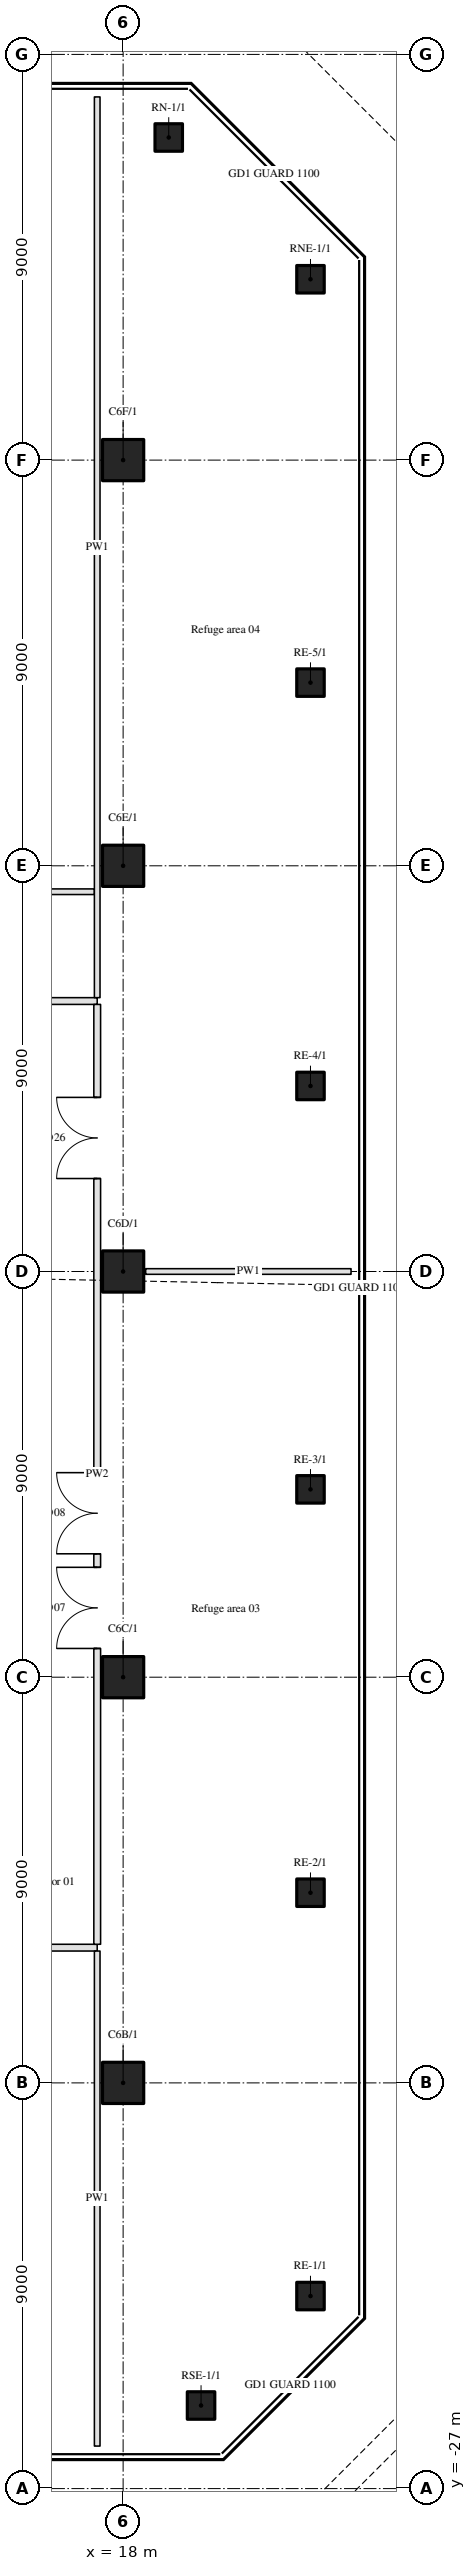
"""IFC4 building model, lengths in metres.
Left out: names, types, materials, properties, quantities, classifications, styles, units other than length and angle.
Written with IfcOpenShell. Run it as: python <this file> out.ifc"""

import sys

from ifc_helpers import new_model, si_unit, direction, frame, frame_2d, origin, origin_2d, place, context, subcontext, project, spatial, rectangle, hollow_circle, extrude, element, fill, save


model = new_model("IFC4")
c1 = context("Model", 3, precision=1e-05, world=origin(), true_north=direction((0.0, 1.0)))
c2 = subcontext(c1, "Body", "Model", "MODEL_VIEW")
j1 = project(units=[si_unit("LENGTHUNIT", "METRE"), si_unit("PLANEANGLEUNIT", "RADIAN")], contexts=[c1])
p1 = place(None, origin())
s1 = spatial("IfcSite", under=j1, at=p1, CompositionType="ELEMENT")
p2 = place(p1, origin())
s2 = spatial("IfcBuilding", under=s1, at=p2, CompositionType="ELEMENT")
p3 = place(p2, frame((0.0, 0.0, 57.6)))
s3 = spatial("IfcBuildingStorey", under=s2, at=p3, CompositionType="ELEMENT", Elevation=57.6)
for number, where, z_axis, x_axis in (
    (1, (18.0, -18.0, 0.0), (0.0, 0.0, 1.0), (1.0, 0.0, 0.0)),
    (2, (18.0, -9.0, 0.0), (0.0, 0.0, 1.0), (1.0, 0.0, 0.0)),
    (3, (18.0, 0.0, 0.0), (0.0, 0.0, 1.0), (1.0, 0.0, 0.0)),
    (4, (18.0, 9.0, 0.0), (0.0, 0.0, 1.0), (1.0, 0.0, 0.0)),
    (5, (18.0, 18.0, 0.0), (0.0, 0.0, 1.0), (1.0, 0.0, 0.0)),
):
    element("IfcColumn", number, at=place(p3, frame(where, z_axis=z_axis, x_axis=x_axis)), inside=s3, PredefinedType="COLUMN", context=c2, shape_type="SweptSolid", body=[
        extrude(hollow_circle(Radius=0.457, WallThickness=0.05, at=origin_2d()), origin(), (0.0, 0.0, 1.0), 4.5),
    ])
for number, where, z_axis, x_axis in (
    (6, (19.729, -25.157, 0.0), (0.0, 0.0, 1.0), (1.0, 0.0, 0.0)),
    (7, (22.157, -22.729, 0.0), (0.0, 0.0, 1.0), (1.0, 0.0, 0.0)),
):
    element("IfcColumn", number, at=place(p3, frame(where, z_axis=z_axis, x_axis=x_axis)), inside=s3, PredefinedType="COLUMN", context=c2, shape_type="SweptSolid", body=[
        extrude(hollow_circle(Radius=0.305, WallThickness=0.03, at=origin_2d()), origin(), (0.0, 0.0, 1.0), 4.08),
    ])
p4 = place(p3, frame((22.157, -13.781, 0.0), z_axis=(0.0, 0.0, 1.0), x_axis=(1.0, 0.0, 0.0)))
e8 = element("IfcColumn", 8, at=p4, inside=s3, PredefinedType="COLUMN", context=c2, shape_type="SweptSolid", body=[
    extrude(hollow_circle(Radius=0.305, WallThickness=0.03, at=origin_2d()), origin(), (0.0, 0.0, 1.0), 4.5),
])
for number, where, z_axis, x_axis in (
    (9, (22.157, -4.833, 0.0), (0.0, 0.0, 1.0), (1.0, 0.0, 0.0)),
    (10, (22.157, 4.116, 0.0), (0.0, 0.0, 1.0), (1.0, 0.0, 0.0)),
    (11, (22.157, 13.064, 0.0), (0.0, 0.0, 1.0), (1.0, 0.0, 0.0)),
    (12, (22.157, 22.012, 0.0), (0.0, 0.0, 1.0), (1.0, 0.0, 0.0)),
    (13, (19.012, 25.157, 0.0), (0.0, 0.0, 1.0), (1.0, 0.0, 0.0)),
):
    element("IfcColumn", number, at=place(p3, frame(where, z_axis=z_axis, x_axis=x_axis)), inside=s3, PredefinedType="COLUMN", context=c2, shape_type="SweptSolid", body=[
        extrude(hollow_circle(Radius=0.305, WallThickness=0.03, at=origin_2d()), origin(), (0.0, 0.0, 1.0), 4.08),
    ])
p5 = place(p3, frame((-17.425, -15.0, 0.0), z_axis=(0.0, 0.0, 1.0), x_axis=(1.0, 0.0, 0.0)))
e14 = element("IfcWall", 14, at=p5, inside=s3, PredefinedType="PARTITIONING", context=c2, shape_type="SweptSolid", body=[
    extrude(rectangle(XDim=34.85, YDim=0.15, at=frame_2d((17.425, 0.0))), origin(), (0.0, 0.0, 1.0), 3.56),
])
p6 = place(p5, frame((16.525, 0.0, 0.0)))
e15 = element("IfcOpeningElement", 15, at=p6, cuts=e14, PredefinedType="OPENING", context=c2, shape_type="SweptSolid", body=[
    extrude(rectangle(XDim=1.8, YDim=2.1, at=frame_2d((0.9, 1.05))), frame((0.0, 0.085, 0.0), z_axis=(0.0, -1.0, 0.0), x_axis=(1.0, 0.0, 0.0)), (0.0, 0.0, 1.0), 0.17),
])
p7 = place(p5, frame((18.625, 0.0, 0.0)))
e16 = element("IfcOpeningElement", 16, at=p7, cuts=e14, PredefinedType="OPENING", context=c2, shape_type="SweptSolid", body=[
    extrude(rectangle(XDim=1.8, YDim=2.1, at=frame_2d((0.9, 1.05))), frame((0.0, 0.085, 0.0), z_axis=(0.0, -1.0, 0.0), x_axis=(1.0, 0.0, 0.0)), (0.0, 0.0, 1.0), 0.17),
])
p8 = place(p3, frame((18.5, 0.0, 0.0), z_axis=(0.0, 0.0, 1.0), x_axis=(1.0, 0.0, 0.0)))
e17 = element("IfcWall", 17, at=p8, inside=s3, PredefinedType="PARTITIONING", context=c2, shape_type="SweptSolid", body=[
    extrude(rectangle(XDim=4.557, YDim=0.125, at=frame_2d((2.278, 0.0))), origin(), (0.0, 0.0, 1.0), 3.56),
])
p9 = place(p3, frame((-0.55, 6.0, 0.0), z_axis=(0.0, 0.0, 1.0), x_axis=(1.0, 0.0, 0.0)))
e18 = element("IfcWall", 18, at=p9, inside=s3, PredefinedType="PARTITIONING", context=c2, shape_type="SweptSolid", body=[
    extrude(rectangle(XDim=17.975, YDim=0.15, at=frame_2d((8.988, 0.0))), origin(), (0.0, 0.0, 1.0), 3.56),
])
p10 = place(p9, frame((1.325, 0.0, 0.0)))
e19 = element("IfcOpeningElement", 19, at=p10, cuts=e18, PredefinedType="OPENING", context=c2, shape_type="SweptSolid", body=[
    extrude(rectangle(XDim=0.9, YDim=2.1, at=frame_2d((0.45, 1.05))), frame((0.0, 0.085, 0.0), z_axis=(0.0, -1.0, 0.0), x_axis=(1.0, 0.0, 0.0)), (0.0, 0.0, 1.0), 0.17),
])
p11 = place(p9, frame((7.1, 0.0, 0.0)))
e20 = element("IfcOpeningElement", 20, at=p11, cuts=e18, PredefinedType="OPENING", context=c2, shape_type="SweptSolid", body=[
    extrude(rectangle(XDim=0.9, YDim=2.1, at=frame_2d((0.45, 1.05))), frame((0.0, 0.085, 0.0), z_axis=(0.0, -1.0, 0.0), x_axis=(1.0, 0.0, 0.0)), (0.0, 0.0, 1.0), 0.17),
])
p12 = place(p9, frame((14.312, 0.0, 0.0)))
e21 = element("IfcOpeningElement", 21, at=p12, cuts=e18, PredefinedType="OPENING", context=c2, shape_type="SweptSolid", body=[
    extrude(rectangle(XDim=0.9, YDim=2.1, at=frame_2d((0.45, 1.05))), frame((0.0, 0.085, 0.0), z_axis=(0.0, -1.0, 0.0), x_axis=(1.0, 0.0, 0.0)), (0.0, 0.0, 1.0), 0.17),
])
p13 = place(p3, frame((-0.65, 8.425, 0.0), z_axis=(0.0, 0.0, 1.0), x_axis=(1.0, 0.0, 0.0)))
e22 = element("IfcWall", 22, at=p13, inside=s3, PredefinedType="PARTITIONING", context=c2, shape_type="SweptSolid", body=[
    extrude(rectangle(XDim=18.012, YDim=0.125, at=frame_2d((9.006, 0.0))), origin(), (0.0, 0.0, 1.0), 3.56),
])
p14 = place(p3, frame((17.425, -26.057, 0.0), z_axis=(0.0, 0.0, 1.0), x_axis=(0.0, 1.0, 0.0)))
e23 = element("IfcWall", 23, at=p14, inside=s3, PredefinedType="PARTITIONING", context=c2, shape_type="SweptSolid", body=[
    extrude(rectangle(XDim=10.982, YDim=0.125, at=frame_2d((5.491, 0.0))), origin(), (0.0, 0.0, 1.0), 3.56),
])
p15 = place(p3, frame((17.425, -14.925, 0.0), z_axis=(0.0, 0.0, 1.0), x_axis=(0.0, 1.0, 0.0)))
e24 = element("IfcWall", 24, at=p15, inside=s3, PredefinedType="PARTITIONING", context=c2, shape_type="SweptSolid", body=[
    extrude(rectangle(XDim=20.85, YDim=0.15, at=frame_2d((10.425, 0.0))), origin(), (0.0, 0.0, 1.0), 3.56),
])
p16 = place(p15, frame((6.562, 0.0, 0.0)))
e25 = element("IfcOpeningElement", 25, at=p16, cuts=e24, PredefinedType="OPENING", context=c2, shape_type="SweptSolid", body=[
    extrude(rectangle(XDim=1.8, YDim=2.1, at=frame_2d((0.9, 1.05))), frame((0.0, 0.085, 0.0), z_axis=(0.0, -1.0, 0.0), x_axis=(1.0, 0.0, 0.0)), (0.0, 0.0, 1.0), 0.17),
])
p17 = place(p15, frame((8.663, 0.0, 0.0)))
e26 = element("IfcOpeningElement", 26, at=p17, cuts=e24, PredefinedType="OPENING", context=c2, shape_type="SweptSolid", body=[
    extrude(rectangle(XDim=1.8, YDim=2.1, at=frame_2d((0.9, 1.05))), frame((0.0, 0.085, 0.0), z_axis=(0.0, -1.0, 0.0), x_axis=(1.0, 0.0, 0.0)), (0.0, 0.0, 1.0), 0.17),
])
p18 = place(p15, frame((16.988, 0.0, 0.0)))
e27 = element("IfcOpeningElement", 27, at=p18, cuts=e24, PredefinedType="OPENING", context=c2, shape_type="SweptSolid", body=[
    extrude(rectangle(XDim=1.8, YDim=2.1, at=frame_2d((0.9, 1.05))), frame((0.0, 0.085, 0.0), z_axis=(0.0, -1.0, 0.0), x_axis=(1.0, 0.0, 0.0)), (0.0, 0.0, 1.0), 0.17),
])
p19 = place(p3, frame((17.425, 6.075, 0.0), z_axis=(0.0, 0.0, 1.0), x_axis=(0.0, 1.0, 0.0)))
e28 = element("IfcWall", 28, at=p19, inside=s3, PredefinedType="PARTITIONING", context=c2, shape_type="SweptSolid", body=[
    extrude(rectangle(XDim=19.982, YDim=0.125, at=frame_2d((9.991, 0.0))), origin(), (0.0, 0.0, 1.0), 3.56),
])
p20 = place(p16, origin())
e29 = element("IfcDoor", 29, at=p20, inside=s3, OperationType="DOUBLE_DOOR_SINGLE_SWING", PredefinedType="DOOR", context=c2, shape_type="SweptSolid", body=[
    extrude(rectangle(XDim=1.8, YDim=2.1, at=frame_2d((0.9, 1.05))), frame((0.0, 0.025, 0.0), z_axis=(0.0, -1.0, 0.0), x_axis=(1.0, 0.0, 0.0)), (0.0, 0.0, 1.0), 0.05),
])
fill(e25, e29)
p21 = place(p17, origin())
e30 = element("IfcDoor", 30, at=p21, inside=s3, OperationType="DOUBLE_DOOR_SINGLE_SWING", PredefinedType="DOOR", context=c2, shape_type="SweptSolid", body=[
    extrude(rectangle(XDim=1.8, YDim=2.1, at=frame_2d((0.9, 1.05))), frame((0.0, 0.025, 0.0), z_axis=(0.0, -1.0, 0.0), x_axis=(1.0, 0.0, 0.0)), (0.0, 0.0, 1.0), 0.05),
])
fill(e26, e30)
p22 = place(p18, origin())
e31 = element("IfcDoor", 31, at=p22, inside=s3, OperationType="DOUBLE_DOOR_SINGLE_SWING", PredefinedType="DOOR", context=c2, shape_type="SweptSolid", body=[
    extrude(rectangle(XDim=1.8, YDim=2.1, at=frame_2d((0.9, 1.05))), frame((0.0, 0.025, 0.0), z_axis=(0.0, -1.0, 0.0), x_axis=(1.0, 0.0, 0.0)), (0.0, 0.0, 1.0), 0.05),
])
fill(e27, e31)
save(model, sys.argv[1])
